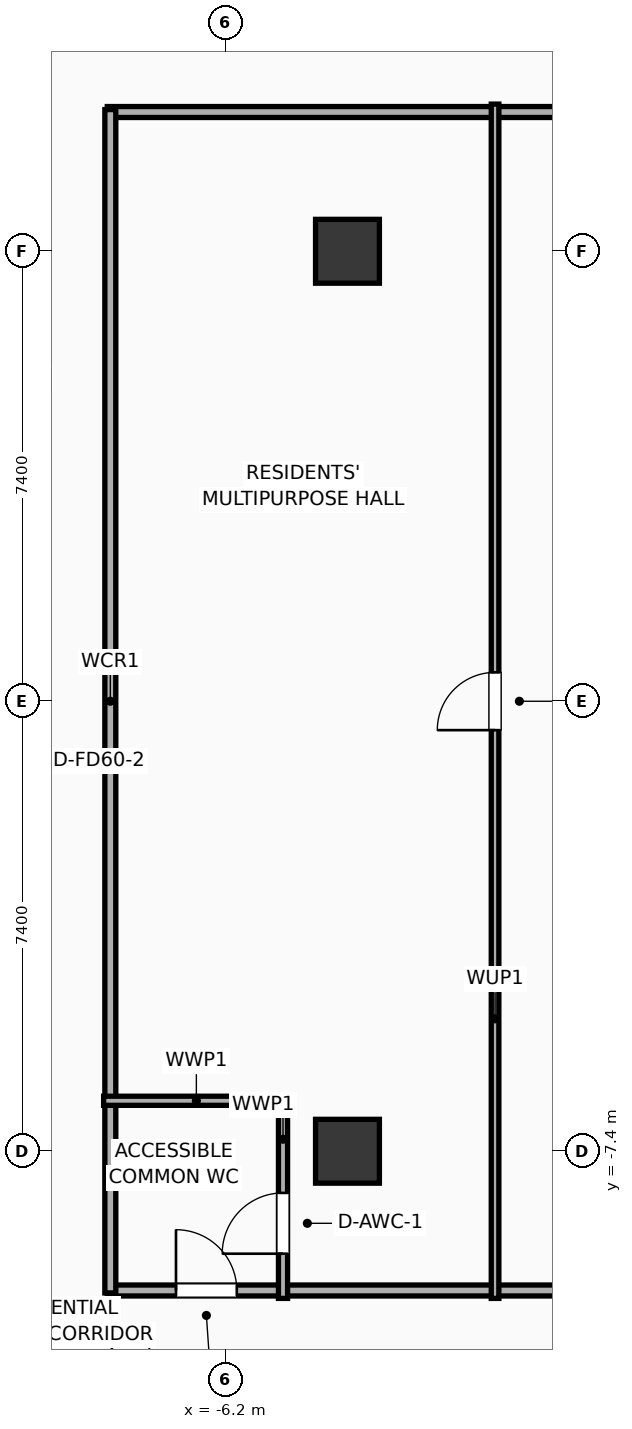
"""IFC4 building model, lengths in metres.
Left out: names, types, materials, properties, quantities, classifications, styles, units other than length and angle.
Written with IfcOpenShell. Run it as: python <this file> out.ifc"""

import sys

from ifc_helpers import new_model, si_unit, direction, frame, frame_2d, origin, origin_2d, place, context, subcontext, project, spatial, rectangle, extrude, element, fill, save


model = new_model("IFC4")
c1 = context("Model", 3, precision=1e-05, world=origin(), true_north=direction((0.0, 1.0)))
c2 = subcontext(c1, "Body", "Model", "MODEL_VIEW")
j1 = project(units=[si_unit("LENGTHUNIT", "METRE"), si_unit("PLANEANGLEUNIT", "RADIAN")], contexts=[c1])
p1 = place(None, origin())
s1 = spatial("IfcSite", under=j1, at=p1, CompositionType="ELEMENT")
p2 = place(p1, origin())
s2 = spatial("IfcBuilding", under=s1, at=p2, CompositionType="ELEMENT")
p3 = place(p2, frame((0.0, 0.0, 49.4)))
s3 = spatial("IfcBuildingStorey", under=s2, at=p3, CompositionType="ELEMENT", Elevation=49.4)
for number, where, z_axis, x_axis in (
    (1, (-4.2, -7.4, 0.0), (0.0, 0.0, 1.0), (1.0, 0.0, 0.0)),
    (2, (-4.2, 7.4, 0.0), (0.0, 0.0, 1.0), (1.0, 0.0, 0.0)),
):
    element("IfcColumn", number, at=place(p3, frame(where, z_axis=z_axis, x_axis=x_axis)), inside=s3, PredefinedType="COLUMN", context=c2, shape_type="SweptSolid", body=[
        extrude(rectangle(XDim=1.05, YDim=1.05, at=origin_2d()), origin(), (0.0, 0.0, 1.0), 3.9),
    ])
p4 = place(p3, frame((-8.15, 9.69, 0.0), z_axis=(0.0, 0.0, 1.0), x_axis=(1.0, 0.0, 0.0)))
e3 = element("IfcWall", 3, at=p4, inside=s3, PredefinedType="PARTITIONING", context=c2, shape_type="SweptSolid", body=[
    extrude(rectangle(XDim=16.3, YDim=0.18, at=frame_2d((8.15, 0.0))), origin(), (0.0, 0.0, 1.0), 3.65),
])
p5 = place(p4, frame((8.49, 0.0, 0.0)))
e4 = element("IfcOpeningElement", 4, at=p5, cuts=e3, PredefinedType="OPENING", context=c2, shape_type="SweptSolid", body=[
    extrude(rectangle(XDim=0.95, YDim=2.05, at=frame_2d((0.475, 1.025))), frame((0.0, 0.1, 0.0), z_axis=(0.0, -1.0, 0.0), x_axis=(1.0, 0.0, 0.0)), (0.0, 0.0, 1.0), 0.2),
])
p6 = place(p3, frame((-8.15, -9.69, 0.0), z_axis=(0.0, 0.0, 1.0), x_axis=(1.0, 0.0, 0.0)))
e5 = element("IfcWall", 5, at=p6, inside=s3, PredefinedType="PARTITIONING", context=c2, shape_type="SweptSolid", body=[
    extrude(rectangle(XDim=16.3, YDim=0.18, at=frame_2d((8.15, 0.0))), origin(), (0.0, 0.0, 1.0), 3.65),
])
p7 = place(p6, frame((1.13, 0.0, 0.0)))
e6 = element("IfcOpeningElement", 6, at=p7, cuts=e5, PredefinedType="OPENING", context=c2, shape_type="SweptSolid", body=[
    extrude(rectangle(XDim=1.0, YDim=2.05, at=frame_2d((0.5, 1.025))), frame((0.0, 0.1, 0.0), z_axis=(0.0, -1.0, 0.0), x_axis=(1.0, 0.0, 0.0)), (0.0, 0.0, 1.0), 0.2),
])
p8 = place(p6, frame((10.12, 0.0, 0.0)))
e7 = element("IfcOpeningElement", 7, at=p8, cuts=e5, PredefinedType="OPENING", context=c2, shape_type="SweptSolid", body=[
    extrude(rectangle(XDim=0.95, YDim=2.05, at=frame_2d((0.475, 1.025))), frame((0.0, 0.1, 0.0), z_axis=(0.0, -1.0, 0.0), x_axis=(1.0, 0.0, 0.0)), (0.0, 0.0, 1.0), 0.2),
])
p9 = place(p3, frame((-8.1, -9.73, 0.0), z_axis=(0.0, 0.0, 1.0), x_axis=(0.0, 1.0, 0.0)))
e8 = element("IfcWall", 8, at=p9, inside=s3, PredefinedType="PARTITIONING", context=c2, shape_type="SweptSolid", body=[
    extrude(rectangle(XDim=19.46, YDim=0.18, at=frame_2d((9.73, 0.0))), origin(), (0.0, 0.0, 1.0), 3.65),
])
p10 = place(p3, frame((-5.26, -9.82, 0.0), z_axis=(0.0, 0.0, 1.0), x_axis=(0.0, 1.0, 0.0)))
e9 = element("IfcWall", 9, at=p10, inside=s3, PredefinedType="PLUMBINGWALL", context=c2, shape_type="SweptSolid", body=[
    extrude(rectangle(XDim=3.35, YDim=0.15, at=frame_2d((1.675, 0.0))), origin(), (0.0, 0.0, 1.0), 3.65),
])
p11 = place(p10, frame((0.735, 0.0, 0.0)))
e10 = element("IfcOpeningElement", 10, at=p11, cuts=e9, PredefinedType="OPENING", context=c2, shape_type="SweptSolid", body=[
    extrude(rectangle(XDim=1.0, YDim=2.05, at=frame_2d((0.5, 1.025))), frame((0.0, 0.085, 0.0), z_axis=(0.0, -1.0, 0.0), x_axis=(1.0, 0.0, 0.0)), (0.0, 0.0, 1.0), 0.17),
])
p12 = place(p3, frame((-8.21, -6.57, 0.0), z_axis=(0.0, 0.0, 1.0), x_axis=(1.0, 0.0, 0.0)))
e11 = element("IfcWall", 11, at=p12, inside=s3, PredefinedType="PLUMBINGWALL", context=c2, shape_type="SweptSolid", body=[
    extrude(rectangle(XDim=3.05, YDim=0.15, at=frame_2d((1.525, 0.0))), origin(), (0.0, 0.0, 1.0), 3.65),
])
p13 = place(p3, frame((-1.773, -9.82, 0.0), z_axis=(0.0, 0.0, 1.0), x_axis=(0.0, 1.0, 0.0)))
e12 = element("IfcWall", 12, at=p13, inside=s3, PredefinedType="PARTITIONING", context=c2, shape_type="SweptSolid", body=[
    extrude(rectangle(XDim=19.64, YDim=0.125, at=frame_2d((9.82, 0.0))), origin(), (0.0, 0.0, 1.0), 3.65),
])
p14 = place(p13, frame((9.345, 0.0, 0.0)))
e13 = element("IfcOpeningElement", 13, at=p14, cuts=e12, PredefinedType="OPENING", context=c2, shape_type="SweptSolid", body=[
    extrude(rectangle(XDim=0.95, YDim=2.05, at=frame_2d((0.475, 1.025))), frame((0.0, 0.073, 0.0), z_axis=(0.0, -1.0, 0.0), x_axis=(1.0, 0.0, 0.0)), (0.0, 0.0, 1.0), 0.145),
])
p15 = place(p7, origin())
e14 = element("IfcDoor", 14, at=p15, inside=s3, OperationType="SINGLE_SWING_LEFT", PredefinedType="DOOR", context=c2, shape_type="SweptSolid", body=[
    extrude(rectangle(XDim=1.0, YDim=2.05, at=frame_2d((0.5, 1.025))), frame((0.0, 0.025, 0.0), z_axis=(0.0, -1.0, 0.0), x_axis=(1.0, 0.0, 0.0)), (0.0, 0.0, 1.0), 0.05),
])
fill(e6, e14)
p16 = place(p11, origin())
e15 = element("IfcDoor", 15, at=p16, inside=s3, OperationType="SINGLE_SWING_LEFT", PredefinedType="DOOR", context=c2, shape_type="SweptSolid", body=[
    extrude(rectangle(XDim=1.0, YDim=2.05, at=frame_2d((0.5, 1.025))), frame((0.0, 0.025, 0.0), z_axis=(0.0, -1.0, 0.0), x_axis=(1.0, 0.0, 0.0)), (0.0, 0.0, 1.0), 0.05),
])
fill(e10, e15)
p17 = place(p14, origin())
e16 = element("IfcDoor", 16, at=p17, inside=s3, OperationType="SINGLE_SWING_LEFT", PredefinedType="DOOR", context=c2, shape_type="SweptSolid", body=[
    extrude(rectangle(XDim=0.95, YDim=2.05, at=frame_2d((0.475, 1.025))), frame((0.0, 0.025, 0.0), z_axis=(0.0, -1.0, 0.0), x_axis=(1.0, 0.0, 0.0)), (0.0, 0.0, 1.0), 0.05),
])
fill(e13, e16)
save(model, sys.argv[1])
